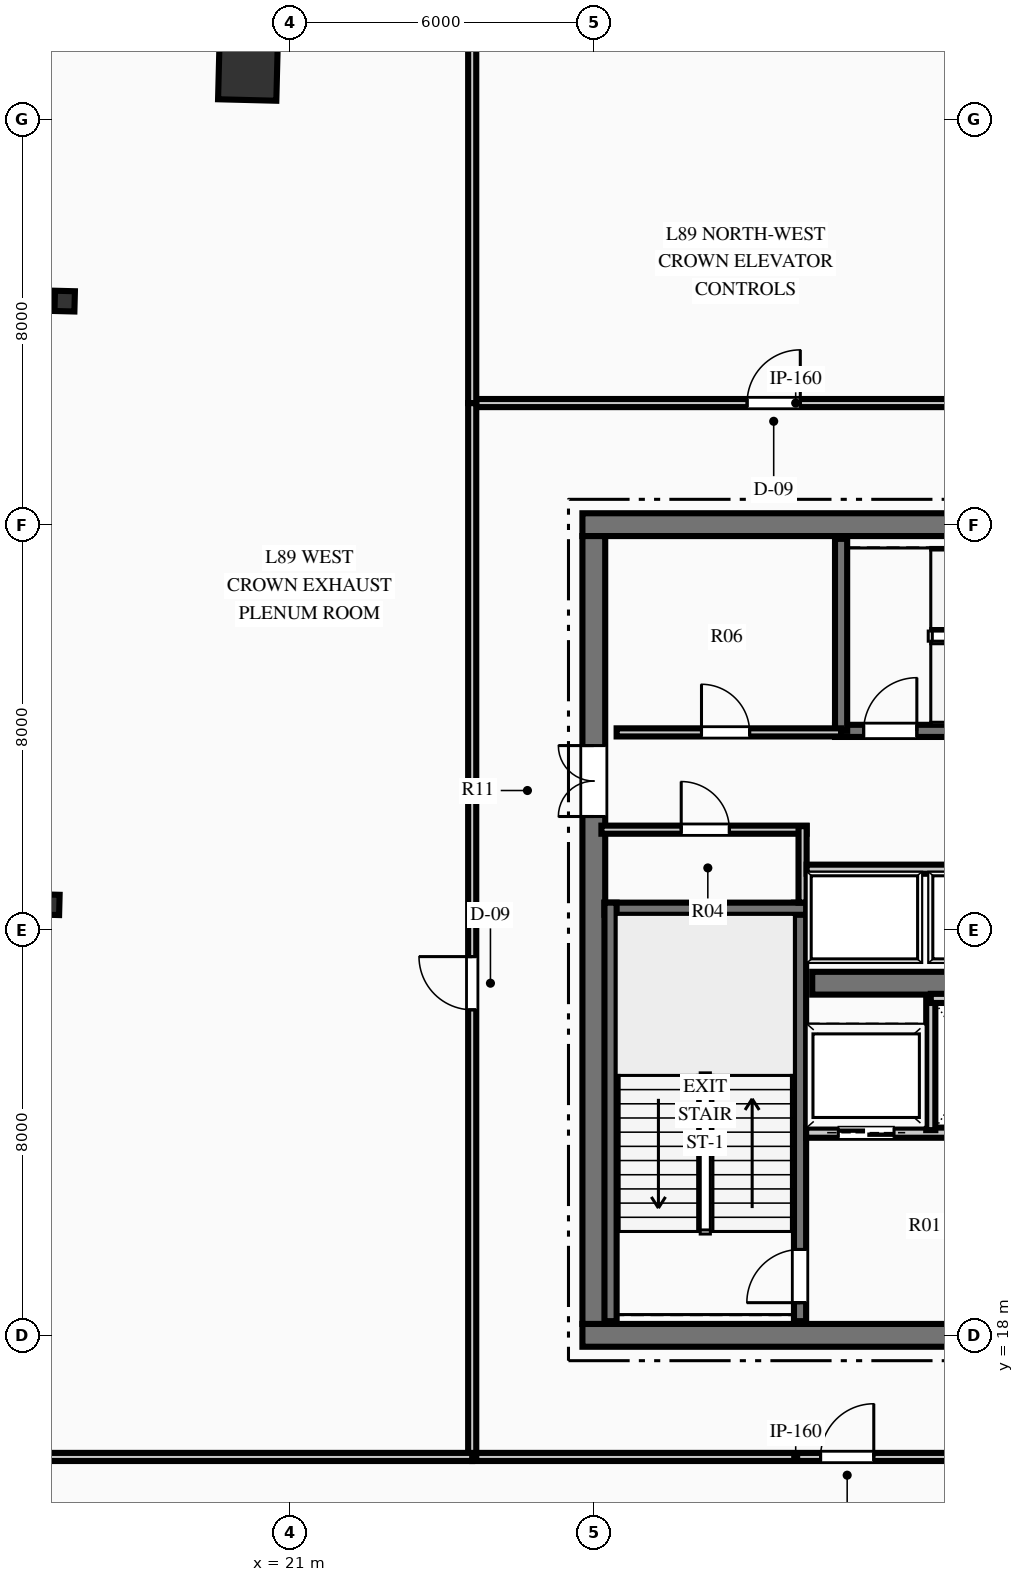
"""IFC4 building model, lengths in metres.
Left out: names, types, materials, properties, quantities, classifications, styles, units other than length and angle.
Written with IfcOpenShell. Run it as: python <this file> out.ifc"""

import sys

from ifc_helpers import new_model, si_unit, direction, frame, frame_2d, origin, origin_2d, place, context, subcontext, project, spatial, rectangle, hollow_rectangle, i_section, extrude, element, fill, save


model = new_model("IFC4")
c1 = context("Model", 3, precision=1e-05, world=origin(), true_north=direction((0.0, 1.0)))
c2 = subcontext(c1, "Body", "Model", "MODEL_VIEW")
j1 = project(units=[si_unit("LENGTHUNIT", "METRE"), si_unit("PLANEANGLEUNIT", "RADIAN")], contexts=[c1])
p1 = place(None, origin())
s1 = spatial("IfcSite", under=j1, at=p1, CompositionType="ELEMENT")
p2 = place(p1, origin())
s2 = spatial("IfcBuilding", under=s1, at=p2, CompositionType="ELEMENT")
p3 = place(p2, frame((0.0, 0.0, 352.2)))
s3 = spatial("IfcBuildingStorey", under=s2, at=p3, CompositionType="ELEMENT", Elevation=352.2)
p4 = place(p3, frame((26.775, 18.0, 0.0), z_axis=(0.0, 0.0, 1.0), x_axis=(1.0, 0.0, 0.0)))
e1 = element("IfcWall", 1, at=p4, inside=s3, PredefinedType="SHEAR", context=c2, shape_type="SweptSolid", body=[
    extrude(rectangle(XDim=18.45, YDim=0.45, at=frame_2d((9.225, 0.0))), origin(), (0.0, 0.0, 1.0), 4.2),
])
p5 = place(p4, frame((7.325, 0.0, 0.0)))
e2 = element("IfcOpeningElement", 2, at=p5, cuts=e1, PredefinedType="OPENING", context=c2, shape_type="SweptSolid", body=[
    extrude(rectangle(XDim=1.1, YDim=2.15, at=frame_2d((0.55, 1.075))), frame((0.0, 0.235, 0.0), z_axis=(0.0, -1.0, 0.0), x_axis=(1.0, 0.0, 0.0)), (0.0, 0.0, 1.0), 0.47),
])
p6 = place(p4, frame((9.505, 0.0, 0.0)))
e3 = element("IfcOpeningElement", 3, at=p6, cuts=e1, PredefinedType="OPENING", context=c2, shape_type="SweptSolid", body=[
    extrude(rectangle(XDim=1.1, YDim=2.15, at=frame_2d((0.55, 1.075))), frame((0.0, 0.235, 0.0), z_axis=(0.0, -1.0, 0.0), x_axis=(1.0, 0.0, 0.0)), (0.0, 0.0, 1.0), 0.47),
])
p7 = place(p3, frame((26.775, 34.0, 0.0), z_axis=(0.0, 0.0, 1.0), x_axis=(1.0, 0.0, 0.0)))
e4 = element("IfcWall", 4, at=p7, inside=s3, PredefinedType="SHEAR", context=c2, shape_type="SweptSolid", body=[
    extrude(rectangle(XDim=18.45, YDim=0.45, at=frame_2d((9.225, 0.0))), origin(), (0.0, 0.0, 1.0), 4.2),
])
p8 = place(p3, frame((27.0, 18.225, 0.0), z_axis=(0.0, 0.0, 1.0), x_axis=(0.0, 1.0, 0.0)))
e5 = element("IfcWall", 5, at=p8, inside=s3, PredefinedType="SHEAR", context=c2, shape_type="SweptSolid", body=[
    extrude(rectangle(XDim=15.55, YDim=0.45, at=frame_2d((7.775, 0.0))), origin(), (0.0, 0.0, 1.0), 4.2),
])
p9 = place(p8, frame((10.015, 0.0, 0.0)))
e6 = element("IfcOpeningElement", 6, at=p9, cuts=e5, PredefinedType="OPENING", context=c2, shape_type="SweptSolid", body=[
    extrude(rectangle(XDim=1.4, YDim=2.2, at=frame_2d((0.7, 1.1))), frame((0.0, 0.235, 0.0), z_axis=(0.0, -1.0, 0.0), x_axis=(1.0, 0.0, 0.0)), (0.0, 0.0, 1.0), 0.47),
])
p10 = place(p3, frame((31.31, 24.95, 0.0), z_axis=(0.0, 0.0, 1.0), x_axis=(1.0, 0.0, 0.0)))
e7 = element("IfcWall", 7, at=p10, inside=s3, PredefinedType="SHEAR", context=c2, shape_type="SweptSolid", body=[
    extrude(rectangle(XDim=9.38, YDim=0.45, at=frame_2d((4.69, 0.0))), origin(), (0.0, 0.0, 1.0), 4.2),
])
p11 = place(p3, frame((31.07, 18.28, 0.0), z_axis=(0.0, 0.0, 1.0), x_axis=(0.0, 1.0, 0.0)))
e8 = element("IfcWall", 8, at=p11, inside=s3, PredefinedType="SHEAR", context=c2, shape_type="SweptSolid", body=[
    extrude(rectangle(XDim=8.26, YDim=0.24, at=frame_2d((4.13, 0.0))), origin(), (0.0, 0.0, 1.0), 4.2),
])
p12 = place(p11, frame((0.365, 0.0, 0.0)))
e9 = element("IfcOpeningElement", 9, at=p12, cuts=e8, PredefinedType="OPENING", context=c2, shape_type="SweptSolid", body=[
    extrude(rectangle(XDim=1.05, YDim=2.15, at=frame_2d((0.525, 1.075))), frame((0.0, 0.13, 0.0), z_axis=(0.0, -1.0, 0.0), x_axis=(1.0, 0.0, 0.0)), (0.0, 0.0, 1.0), 0.26),
])
p13 = place(p3, frame((27.21, 26.42, 0.0), z_axis=(0.0, 0.0, 1.0), x_axis=(1.0, 0.0, 0.0)))
e10 = element("IfcWall", 10, at=p13, inside=s3, PredefinedType="SHEAR", context=c2, shape_type="SweptSolid", body=[
    extrude(rectangle(XDim=3.98, YDim=0.24, at=frame_2d((1.99, 0.0))), origin(), (0.0, 0.0, 1.0), 4.2),
])
p14 = place(p3, frame((27.33, 18.28, 0.0), z_axis=(0.0, 0.0, 1.0), x_axis=(0.0, 1.0, 0.0)))
e11 = element("IfcWall", 11, at=p14, inside=s3, PredefinedType="SHEAR", context=c2, shape_type="SweptSolid", body=[
    extrude(rectangle(XDim=8.26, YDim=0.24, at=frame_2d((4.13, 0.0))), origin(), (0.0, 0.0, 1.0), 4.2),
])
p15 = place(p3, frame((31.76, 29.93, 0.0), z_axis=(0.0, 0.0, 1.0), x_axis=(1.0, 0.0, 0.0)))
e12 = element("IfcWall", 12, at=p15, inside=s3, PredefinedType="SHEAR", context=c2, shape_type="SweptSolid", body=[
    extrude(rectangle(XDim=8.38, YDim=0.24, at=frame_2d((4.19, 0.0))), origin(), (0.0, 0.0, 1.0), 4.2),
])
p16 = place(p15, frame((0.565, 0.0, 0.0)))
e13 = element("IfcOpeningElement", 13, at=p16, cuts=e12, PredefinedType="OPENING", context=c2, shape_type="SweptSolid", body=[
    extrude(rectangle(XDim=1.05, YDim=2.15, at=frame_2d((0.525, 1.075))), frame((0.0, 0.13, 0.0), z_axis=(0.0, -1.0, 0.0), x_axis=(1.0, 0.0, 0.0)), (0.0, 0.0, 1.0), 0.26),
])
p17 = place(p3, frame((31.88, 29.93, 0.0), z_axis=(0.0, 0.0, 1.0), x_axis=(0.0, 1.0, 0.0)))
e14 = element("IfcWall", 14, at=p17, inside=s3, PredefinedType="SHEAR", context=c2, shape_type="SweptSolid", body=[
    extrude(rectangle(XDim=3.79, YDim=0.24, at=frame_2d((1.895, 0.0))), origin(), (0.0, 0.0, 1.0), 4.2),
])
p18 = place(p3, frame((20.174, 42.956, 0.0), z_axis=(0.0, 0.0, 1.0), x_axis=(0.025304572866, 0.999679788028, 0.0)))
e15 = element("IfcColumn", 15, at=p18, inside=s3, PredefinedType="COLUMN", context=c2, shape_type="SweptSolid", body=[
    extrude(hollow_rectangle(XDim=1.15, YDim=1.15, WallThickness=0.05, at=origin_2d()), origin(), (0.0, 0.0, 1.0), 4.2),
])
for number, where, z_axis, x_axis in (
    (16, (16.558, 38.412, 0.0), (0.0, 0.0, 1.0), (0.025, 1.0, 0.0)),
    (17, (16.256, 26.5, 0.0), (0.0, 0.0, 1.0), (0.025, 1.0, 0.0)),
):
    element("IfcColumn", number, at=place(p3, frame(where, z_axis=z_axis, x_axis=x_axis)), inside=s3, PredefinedType="COLUMN", context=c2, shape_type="SweptSolid", body=[
        extrude(i_section(OverallWidth=0.4, OverallDepth=0.393, WebThickness=0.023, FlangeThickness=0.037, at=origin_2d()), origin(), (0.0, 0.0, 1.0), 4.2),
    ])
p19 = place(p3, frame((16.328, 5.05, 0.0), z_axis=(0.0, 0.0, 1.0), x_axis=(-0.114936569822, 0.993372832786, 0.0)))
e18 = element("IfcWall", 18, at=p19, inside=s3, PredefinedType="STANDARD", context=c2, shape_type="SweptSolid", body=[
    extrude(rectangle(XDim=37.1, YDim=0.25, at=frame_2d((18.55, 0.0))), origin(), (0.0, 0.0, 1.0), 3.8),
])
p20 = place(p3, frame((31.19, 22.0, 0.0), z_axis=(0.0, 0.0, 1.0), x_axis=(1.0, 0.0, 0.0)))
e19 = element("IfcWall", 19, at=p20, inside=s3, PredefinedType="PARTITIONING", context=c2, shape_type="SweptSolid", body=[
    extrude(rectangle(XDim=4.69, YDim=0.2, at=frame_2d((2.345, 0.0))), origin(), (0.0, 0.0, 1.0), 3.8),
])
p21 = place(p20, frame((2.91, 0.0, 0.0)))
e20 = element("IfcOpeningElement", 20, at=p21, cuts=e19, PredefinedType="OPENING", context=c2, shape_type="SweptSolid", body=[
    extrude(rectangle(XDim=0.9, YDim=2.15, at=frame_2d((0.45, 1.075))), frame((0.0, 0.11, 0.0), z_axis=(0.0, -1.0, 0.0), x_axis=(1.0, 0.0, 0.0)), (0.0, 0.0, 1.0), 0.22),
])
p22 = place(p20, frame((0.635, 0.0, 0.0)))
e21 = element("IfcOpeningElement", 21, at=p22, cuts=e19, PredefinedType="OPENING", context=c2, shape_type="SweptSolid", body=[
    extrude(rectangle(XDim=1.1, YDim=2.15, at=frame_2d((0.55, 1.075))), frame((0.0, 0.11, 0.0), z_axis=(0.0, -1.0, 0.0), x_axis=(1.0, 0.0, 0.0)), (0.0, 0.0, 1.0), 0.22),
])
p23 = place(p3, frame((33.65, 22.05, 0.0), z_axis=(0.0, 0.0, 1.0), x_axis=(0.0, 1.0, 0.0)))
e22 = element("IfcWall", 22, at=p23, inside=s3, PredefinedType="PARTITIONING", context=c2, shape_type="SweptSolid", body=[
    extrude(rectangle(XDim=2.6, YDim=0.18, at=frame_2d((1.3, 0.0))), origin(), (0.0, 0.0, 1.0), 3.8),
])
p24 = place(p3, frame((33.65, 24.65, 0.0), z_axis=(0.0, 0.0, 1.0), x_axis=(1.0, 0.0, 0.0)))
e23 = element("IfcWall", 23, at=p24, inside=s3, PredefinedType="PARTITIONING", context=c2, shape_type="SweptSolid", body=[
    extrude(rectangle(XDim=1.8, YDim=0.18, at=frame_2d((0.9, 0.0))), origin(), (0.0, 0.0, 1.0), 3.8),
])
p25 = place(p3, frame((27.15, 27.98, 0.0), z_axis=(0.0, 0.0, 1.0), x_axis=(1.0, 0.0, 0.0)))
e24 = element("IfcWall", 24, at=p25, inside=s3, PredefinedType="PARTITIONING", context=c2, shape_type="SweptSolid", body=[
    extrude(rectangle(XDim=4.05, YDim=0.16, at=frame_2d((2.025, 0.0))), origin(), (0.0, 0.0, 1.0), 3.8),
])
p26 = place(p25, frame((1.575, 0.0, 0.0)))
e25 = element("IfcOpeningElement", 25, at=p26, cuts=e24, PredefinedType="OPENING", context=c2, shape_type="SweptSolid", body=[
    extrude(rectangle(XDim=0.95, YDim=2.15, at=frame_2d((0.475, 1.075))), frame((0.0, 0.09, 0.0), z_axis=(0.0, -1.0, 0.0), x_axis=(1.0, 0.0, 0.0)), (0.0, 0.0, 1.0), 0.18),
])
p27 = place(p3, frame((31.12, 26.54, 0.0), z_axis=(0.0, 0.0, 1.0), x_axis=(0.0, 1.0, 0.0)))
e26 = element("IfcWall", 26, at=p27, inside=s3, PredefinedType="PARTITIONING", context=c2, shape_type="SweptSolid", body=[
    extrude(rectangle(XDim=1.51, YDim=0.16, at=frame_2d((0.755, 0.0))), origin(), (0.0, 0.0, 1.0), 3.8),
])
p28 = place(p3, frame((27.45, 29.9, 0.0), z_axis=(0.0, 0.0, 1.0), x_axis=(1.0, 0.0, 0.0)))
e27 = element("IfcWall", 27, at=p28, inside=s3, PredefinedType="PARTITIONING", context=c2, shape_type="SweptSolid", body=[
    extrude(rectangle(XDim=4.43, YDim=0.16, at=frame_2d((2.215, 0.0))), origin(), (0.0, 0.0, 1.0), 3.8),
])
p29 = place(p28, frame((1.675, 0.0, 0.0)))
e28 = element("IfcOpeningElement", 28, at=p29, cuts=e27, PredefinedType="OPENING", context=c2, shape_type="SweptSolid", body=[
    extrude(rectangle(XDim=0.95, YDim=2.15, at=frame_2d((0.475, 1.075))), frame((0.0, 0.09, 0.0), z_axis=(0.0, -1.0, 0.0), x_axis=(1.0, 0.0, 0.0)), (0.0, 0.0, 1.0), 0.18),
])
p30 = place(p3, frame((31.2, 27.2, 0.0), z_axis=(0.0, 0.0, 1.0), x_axis=(1.0, 0.0, 0.0)))
e29 = element("IfcWall", 29, at=p30, inside=s3, PredefinedType="PARTITIONING", context=c2, shape_type="SweptSolid", body=[
    extrude(rectangle(XDim=9.6, YDim=0.18, at=frame_2d((4.8, 0.0))), origin(), (0.0, 0.0, 1.0), 3.8),
])
p31 = place(p30, frame((4.325, 0.0, 0.0)))
e30 = element("IfcOpeningElement", 30, at=p31, cuts=e29, PredefinedType="OPENING", context=c2, shape_type="SweptSolid", body=[
    extrude(rectangle(XDim=0.95, YDim=2.15, at=frame_2d((0.475, 1.075))), frame((0.0, 0.1, 0.0), z_axis=(0.0, -1.0, 0.0), x_axis=(1.0, 0.0, 0.0)), (0.0, 0.0, 1.0), 0.2),
])
p32 = place(p3, frame((24.6, 15.6, 0.0), z_axis=(0.0, 0.0, 1.0), x_axis=(1.0, 0.0, 0.0)))
e31 = element("IfcWall", 31, at=p32, inside=s3, PredefinedType="PARTITIONING", context=c2, shape_type="SweptSolid", body=[
    extrude(rectangle(XDim=22.8, YDim=0.16, at=frame_2d((11.4, 0.0))), origin(), (0.0, 0.0, 1.0), 3.8),
])
p33 = place(p32, frame((6.875, 0.0, 0.0)))
e32 = element("IfcOpeningElement", 32, at=p33, cuts=e31, PredefinedType="OPENING", context=c2, shape_type="SweptSolid", body=[
    extrude(rectangle(XDim=1.05, YDim=2.15, at=frame_2d((0.525, 1.075))), frame((0.0, 0.09, 0.0), z_axis=(0.0, -1.0, 0.0), x_axis=(1.0, 0.0, 0.0)), (0.0, 0.0, 1.0), 0.18),
])
p34 = place(p32, frame((16.325, 0.0, 0.0)))
e33 = element("IfcOpeningElement", 33, at=p34, cuts=e31, PredefinedType="OPENING", context=c2, shape_type="SweptSolid", body=[
    extrude(rectangle(XDim=1.05, YDim=2.15, at=frame_2d((0.525, 1.075))), frame((0.0, 0.09, 0.0), z_axis=(0.0, -1.0, 0.0), x_axis=(1.0, 0.0, 0.0)), (0.0, 0.0, 1.0), 0.18),
])
p35 = place(p3, frame((24.6, 36.4, 0.0), z_axis=(0.0, 0.0, 1.0), x_axis=(1.0, 0.0, 0.0)))
e34 = element("IfcWall", 34, at=p35, inside=s3, PredefinedType="PARTITIONING", context=c2, shape_type="SweptSolid", body=[
    extrude(rectangle(XDim=22.8, YDim=0.16, at=frame_2d((11.4, 0.0))), origin(), (0.0, 0.0, 1.0), 3.8),
])
p36 = place(p35, frame((5.425, 0.0, 0.0)))
e35 = element("IfcOpeningElement", 35, at=p36, cuts=e34, PredefinedType="OPENING", context=c2, shape_type="SweptSolid", body=[
    extrude(rectangle(XDim=1.05, YDim=2.15, at=frame_2d((0.525, 1.075))), frame((0.0, 0.09, 0.0), z_axis=(0.0, -1.0, 0.0), x_axis=(1.0, 0.0, 0.0)), (0.0, 0.0, 1.0), 0.18),
])
p37 = place(p35, frame((14.875, 0.0, 0.0)))
e36 = element("IfcOpeningElement", 36, at=p37, cuts=e34, PredefinedType="OPENING", context=c2, shape_type="SweptSolid", body=[
    extrude(rectangle(XDim=1.05, YDim=2.15, at=frame_2d((0.525, 1.075))), frame((0.0, 0.09, 0.0), z_axis=(0.0, -1.0, 0.0), x_axis=(1.0, 0.0, 0.0)), (0.0, 0.0, 1.0), 0.18),
])
p38 = place(p3, frame((24.6, 15.6, 0.0), z_axis=(0.0, 0.0, 1.0), x_axis=(0.0, 1.0, 0.0)))
e37 = element("IfcWall", 37, at=p38, inside=s3, PredefinedType="PARTITIONING", context=c2, shape_type="SweptSolid", body=[
    extrude(rectangle(XDim=20.8, YDim=0.16, at=frame_2d((10.4, 0.0))), origin(), (0.0, 0.0, 1.0), 3.8),
])
p39 = place(p38, frame((8.825, 0.0, 0.0)))
e38 = element("IfcOpeningElement", 38, at=p39, cuts=e37, PredefinedType="OPENING", context=c2, shape_type="SweptSolid", body=[
    extrude(rectangle(XDim=1.05, YDim=2.15, at=frame_2d((0.525, 1.075))), frame((0.0, 0.09, 0.0), z_axis=(0.0, -1.0, 0.0), x_axis=(1.0, 0.0, 0.0)), (0.0, 0.0, 1.0), 0.18),
])
p40 = place(p3, frame((15.147, 15.6, 0.0), z_axis=(0.0, 0.0, 1.0), x_axis=(1.0, 0.0, 0.0)))
e39 = element("IfcWall", 39, at=p40, inside=s3, PredefinedType="PARTITIONING", context=c2, shape_type="SweptSolid", body=[
    extrude(rectangle(XDim=9.453, YDim=0.16, at=frame_2d((4.727, 0.0))), origin(), (0.0, 0.0, 1.0), 3.8),
])
p41 = place(p3, frame((24.6, 36.4, 0.0), z_axis=(0.0, 0.0, 1.0), x_axis=(0.0, 1.0, 0.0)))
e40 = element("IfcWall", 40, at=p41, inside=s3, PredefinedType="PARTITIONING", context=c2, shape_type="SweptSolid", body=[
    extrude(rectangle(XDim=10.639, YDim=0.16, at=frame_2d((5.32, 0.0))), origin(), (0.0, 0.0, 1.0), 3.8),
])
p42 = place(p26, origin())
e41 = element("IfcDoor", 41, at=p42, inside=s3, OperationType="SINGLE_SWING_LEFT", PredefinedType="DOOR", context=c2, shape_type="SweptSolid", body=[
    extrude(rectangle(XDim=0.95, YDim=2.15, at=frame_2d((0.475, 1.075))), frame((0.0, 0.025, 0.0), z_axis=(0.0, -1.0, 0.0), x_axis=(1.0, 0.0, 0.0)), (0.0, 0.0, 1.0), 0.05),
])
fill(e25, e41)
p43 = place(p29, origin())
e42 = element("IfcDoor", 42, at=p43, inside=s3, OperationType="SINGLE_SWING_LEFT", PredefinedType="DOOR", context=c2, shape_type="SweptSolid", body=[
    extrude(rectangle(XDim=0.95, YDim=2.15, at=frame_2d((0.475, 1.075))), frame((0.0, 0.025, 0.0), z_axis=(0.0, -1.0, 0.0), x_axis=(1.0, 0.0, 0.0)), (0.0, 0.0, 1.0), 0.05),
])
fill(e28, e42)
p44 = place(p12, origin())
e43 = element("IfcDoor", 43, at=p44, inside=s3, OperationType="SINGLE_SWING_LEFT", PredefinedType="DOOR", context=c2, shape_type="SweptSolid", body=[
    extrude(rectangle(XDim=1.05, YDim=2.15, at=frame_2d((0.525, 1.075))), frame((0.0, 0.025, 0.0), z_axis=(0.0, -1.0, 0.0), x_axis=(1.0, 0.0, 0.0)), (0.0, 0.0, 1.0), 0.05),
])
fill(e9, e43)
p45 = place(p16, origin())
e44 = element("IfcDoor", 44, at=p45, inside=s3, OperationType="SINGLE_SWING_RIGHT", PredefinedType="DOOR", context=c2, shape_type="SweptSolid", body=[
    extrude(rectangle(XDim=1.05, YDim=2.15, at=frame_2d((0.525, 1.075))), frame((0.0, 0.025, 0.0), z_axis=(0.0, -1.0, 0.0), x_axis=(1.0, 0.0, 0.0)), (0.0, 0.0, 1.0), 0.05),
])
fill(e13, e44)
p46 = place(p9, origin())
e45 = element("IfcDoor", 45, at=p46, inside=s3, OperationType="DOUBLE_DOOR_SINGLE_SWING", PredefinedType="DOOR", context=c2, shape_type="SweptSolid", body=[
    extrude(rectangle(XDim=1.4, YDim=2.2, at=frame_2d((0.7, 1.1))), frame((0.0, 0.025, 0.0), z_axis=(0.0, -1.0, 0.0), x_axis=(1.0, 0.0, 0.0)), (0.0, 0.0, 1.0), 0.05),
])
fill(e6, e45)
p47 = place(p33, origin())
e46 = element("IfcDoor", 46, at=p47, inside=s3, OperationType="SINGLE_SWING_RIGHT", PredefinedType="DOOR", context=c2, shape_type="SweptSolid", body=[
    extrude(rectangle(XDim=1.05, YDim=2.15, at=frame_2d((0.525, 1.075))), frame((0.0, 0.025, 0.0), z_axis=(0.0, -1.0, 0.0), x_axis=(1.0, 0.0, 0.0)), (0.0, 0.0, 1.0), 0.05),
])
fill(e32, e46)
p48 = place(p39, origin())
e47 = element("IfcDoor", 47, at=p48, inside=s3, OperationType="SINGLE_SWING_RIGHT", PredefinedType="DOOR", context=c2, shape_type="SweptSolid", body=[
    extrude(rectangle(XDim=1.05, YDim=2.15, at=frame_2d((0.525, 1.075))), frame((0.0, 0.025, 0.0), z_axis=(0.0, -1.0, 0.0), x_axis=(1.0, 0.0, 0.0)), (0.0, 0.0, 1.0), 0.05),
])
fill(e38, e47)
p49 = place(p36, origin())
e48 = element("IfcDoor", 48, at=p49, inside=s3, OperationType="SINGLE_SWING_RIGHT", PredefinedType="DOOR", context=c2, shape_type="SweptSolid", body=[
    extrude(rectangle(XDim=1.05, YDim=2.15, at=frame_2d((0.525, 1.075))), frame((0.0, 0.025, 0.0), z_axis=(0.0, -1.0, 0.0), x_axis=(1.0, 0.0, 0.0)), (0.0, 0.0, 1.0), 0.05),
])
fill(e35, e48)
p50 = place(p22, origin())
e49 = element("IfcDoor", 49, at=p50, inside=s3, OperationType="SLIDING_TO_LEFT", PredefinedType="DOOR", context=c2, shape_type="SweptSolid", body=[
    extrude(rectangle(XDim=1.1, YDim=2.15, at=frame_2d((0.55, 1.075))), frame((0.0, 0.025, 0.0), z_axis=(0.0, -1.0, 0.0), x_axis=(1.0, 0.0, 0.0)), (0.0, 0.0, 1.0), 0.05),
])
fill(e21, e49)
save(model, sys.argv[1])
